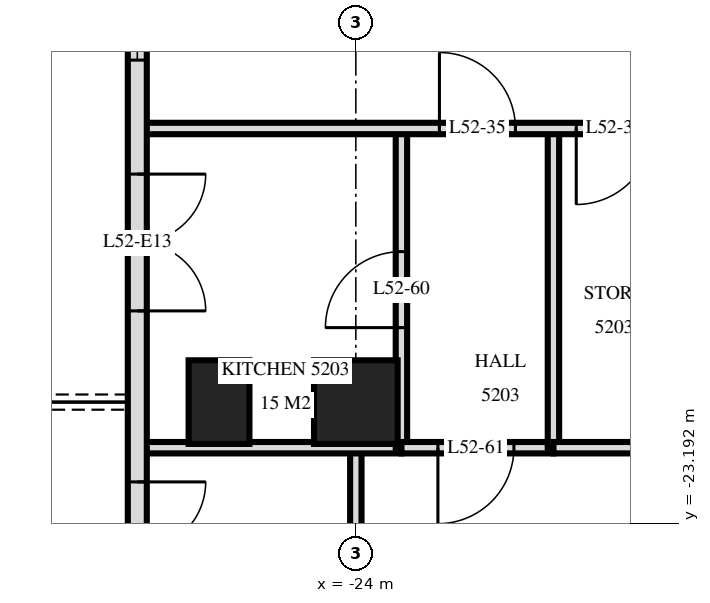
"""IFC4 building model, lengths in metres.
Left out: names, types, materials, properties, quantities, classifications, styles, units other than length and angle.
Written with IfcOpenShell. Run it as: python <this file> out.ifc"""

import sys

from ifc_helpers import new_model, si_unit, direction, frame, frame_2d, origin, origin_2d, place, context, subcontext, project, spatial, rectangle, extrude, element, fill, save


model = new_model("IFC4")
c1 = context("Model", 3, precision=1e-05, world=origin(), true_north=direction((0.0, 1.0)))
c2 = subcontext(c1, "Body", "Model", "MODEL_VIEW")
j1 = project(units=[si_unit("LENGTHUNIT", "METRE"), si_unit("PLANEANGLEUNIT", "RADIAN")], contexts=[c1])
p1 = place(None, origin())
s1 = spatial("IfcSite", under=j1, at=p1, CompositionType="ELEMENT")
p2 = place(p1, origin())
s2 = spatial("IfcBuilding", under=s1, at=p2, CompositionType="ELEMENT")
p3 = place(p2, frame((0.0, 0.0, 201.1)))
s3 = spatial("IfcBuildingStorey", under=s2, at=p3, CompositionType="ELEMENT", Elevation=201.1)
p4 = place(p3, frame((-25.8, -21.6, 0.0), z_axis=(0.0, 0.0, 1.0), x_axis=(0.0, 1.0, 0.0)))
e1 = element("IfcColumn", 1, at=p4, inside=s3, PredefinedType="COLUMN", context=c2, shape_type="SweptSolid", body=[
    extrude(rectangle(XDim=1.1, YDim=0.8, at=origin_2d()), origin(), (0.0, 0.0, 1.0), 3.5),
])
p5 = place(p3, frame((-24.0, -21.6, 0.0), z_axis=(0.0, 0.0, 1.0), x_axis=(1.0, 0.0, 0.0)))
e2 = element("IfcColumn", 2, at=p5, inside=s3, PredefinedType="COLUMN", context=c2, shape_type="SweptSolid", body=[
    extrude(rectangle(XDim=1.1, YDim=1.1, at=origin_2d()), origin(), (0.0, 0.0, 1.0), 3.5),
])
p6 = place(p3, frame((-26.875, -3.325, 0.0), z_axis=(0.0, 0.0, 1.0), x_axis=(0.0, -1.0, 0.0)))
e3 = element("IfcWall", 3, at=p6, inside=s3, PredefinedType="SOLIDWALL", context=c2, shape_type="SweptSolid", body=[
    extrude(rectangle(XDim=21.551, YDim=0.25, at=frame_2d((10.775, 0.0))), origin(), (0.0, 0.0, 1.0), 3.22),
])
p7 = place(p6, frame((7.775, 0.0, 0.0)))
e4 = element("IfcOpeningElement", 4, at=p7, cuts=e3, PredefinedType="OPENING", context=c2, shape_type="SweptSolid", body=[
    extrude(rectangle(XDim=1.8, YDim=2.4, at=frame_2d((0.9, 1.2))), frame((0.0, 0.135, 0.0), z_axis=(0.0, -1.0, 0.0), x_axis=(1.0, 0.0, 0.0)), (0.0, 0.0, 1.0), 0.27),
])
p8 = place(p6, frame((12.575, 0.0, 0.9)))
e5 = element("IfcOpeningElement", 5, at=p8, cuts=e3, PredefinedType="OPENING", context=c2, shape_type="SweptSolid", body=[
    extrude(rectangle(XDim=1.2, YDim=1.5, at=frame_2d((0.6, 0.75))), frame((0.0, 0.135, 0.0), z_axis=(0.0, -1.0, 0.0), x_axis=(1.0, 0.0, 0.0)), (0.0, 0.0, 1.0), 0.27),
])
p9 = place(p6, frame((15.275, 0.0, 0.0)))
e6 = element("IfcOpeningElement", 6, at=p9, cuts=e3, PredefinedType="OPENING", context=c2, shape_type="SweptSolid", body=[
    extrude(rectangle(XDim=1.8, YDim=2.4, at=frame_2d((0.9, 1.2))), frame((0.0, 0.135, 0.0), z_axis=(0.0, -1.0, 0.0), x_axis=(1.0, 0.0, 0.0)), (0.0, 0.0, 1.0), 0.27),
])
p10 = place(p6, frame((19.325, 0.0, 0.0)))
e7 = element("IfcOpeningElement", 7, at=p10, cuts=e3, PredefinedType="OPENING", context=c2, shape_type="SweptSolid", body=[
    extrude(rectangle(XDim=1.8, YDim=2.4, at=frame_2d((0.9, 1.2))), frame((0.0, 0.135, 0.0), z_axis=(0.0, -1.0, 0.0), x_axis=(1.0, 0.0, 0.0)), (0.0, 0.0, 1.0), 0.27),
])
p11 = place(p3, frame((-21.4, -22.2, 0.0), z_axis=(0.0, 0.0, 1.0), x_axis=(0.0, 1.0, 0.0)))
e8 = element("IfcWall", 8, at=p11, inside=s3, PredefinedType="PARTITIONING", context=c2, shape_type="SweptSolid", body=[
    extrude(rectangle(XDim=4.2, YDim=0.15, at=frame_2d((2.1, 0.0))), origin(), (0.0, 0.0, 1.0), 3.22),
])
p12 = place(p3, frame((-23.4, -22.2, 0.0), z_axis=(0.0, 0.0, 1.0), x_axis=(0.0, 1.0, 0.0)))
e9 = element("IfcWall", 9, at=p12, inside=s3, PredefinedType="PARTITIONING", context=c2, shape_type="SweptSolid", body=[
    extrude(rectangle(XDim=4.2, YDim=0.15, at=frame_2d((2.1, 0.0))), origin(), (0.0, 0.0, 1.0), 3.22),
])
p13 = place(p12, frame((1.58, 0.0, 0.0)))
e10 = element("IfcOpeningElement", 10, at=p13, cuts=e9, PredefinedType="OPENING", context=c2, shape_type="SweptSolid", body=[
    extrude(rectangle(XDim=1.0, YDim=2.1, at=frame_2d((0.5, 1.05))), frame((0.0, 0.085, 0.0), z_axis=(0.0, -1.0, 0.0), x_axis=(1.0, 0.0, 0.0)), (0.0, 0.0, 1.0), 0.17),
])
p14 = place(p3, frame((-24.0, -28.918, 0.0), z_axis=(0.0, 0.0, 1.0), x_axis=(0.0, 1.0, 0.0)))
e11 = element("IfcWall", 11, at=p14, inside=s3, PredefinedType="PARTITIONING", context=c2, shape_type="SweptSolid", body=[
    extrude(rectangle(XDim=6.718, YDim=0.15, at=frame_2d((3.359, 0.0))), origin(), (0.0, 0.0, 1.0), 3.22),
])
p15 = place(p14, frame((2.936, 0.0, 0.0)))
e12 = element("IfcOpeningElement", 12, at=p15, cuts=e11, PredefinedType="OPENING", context=c2, shape_type="SweptSolid", body=[
    extrude(rectangle(XDim=0.9, YDim=2.1, at=frame_2d((0.45, 1.05))), frame((0.0, 0.085, 0.0), z_axis=(0.0, -1.0, 0.0), x_axis=(1.0, 0.0, 0.0)), (0.0, 0.0, 1.0), 0.17),
])
p16 = place(p3, frame((-23.4, -22.2, 0.0), z_axis=(0.0, 0.0, 1.0), x_axis=(1.0, 0.0, 0.0)))
e13 = element("IfcWall", 13, at=p16, inside=s3, PredefinedType="PARTITIONING", context=c2, shape_type="SweptSolid", body=[
    extrude(rectangle(XDim=2.0, YDim=0.15, at=frame_2d((1.0, 0.0))), origin(), (0.0, 0.0, 1.0), 3.22),
])
p17 = place(p16, frame((0.48, 0.0, 0.0)))
e14 = element("IfcOpeningElement", 14, at=p17, cuts=e13, PredefinedType="OPENING", context=c2, shape_type="SweptSolid", body=[
    extrude(rectangle(XDim=1.0, YDim=2.1, at=frame_2d((0.5, 1.05))), frame((0.0, 0.085, 0.0), z_axis=(0.0, -1.0, 0.0), x_axis=(1.0, 0.0, 0.0)), (0.0, 0.0, 1.0), 0.17),
])
p18 = place(p3, frame((-26.82, -22.2, 0.0), z_axis=(0.0, 0.0, 1.0), x_axis=(1.0, 0.0, 0.0)))
e15 = element("IfcWall", 15, at=p18, inside=s3, PredefinedType="PARTITIONING", context=c2, shape_type="SweptSolid", body=[
    extrude(rectangle(XDim=3.42, YDim=0.15, at=frame_2d((1.71, 0.0))), origin(), (0.0, 0.0, 1.0), 3.22),
])
p19 = place(p3, frame((-21.4, -22.2, 0.0), z_axis=(0.0, 0.0, 1.0), x_axis=(1.0, 0.0, 0.0)))
e16 = element("IfcWall", 16, at=p19, inside=s3, PredefinedType="PARTITIONING", context=c2, shape_type="SweptSolid", body=[
    extrude(rectangle(XDim=6.4, YDim=0.15, at=frame_2d((3.2, 0.0))), origin(), (0.0, 0.0, 1.0), 3.22),
])
p20 = place(p19, frame((4.78, 0.0, 0.0)))
e17 = element("IfcOpeningElement", 17, at=p20, cuts=e16, PredefinedType="OPENING", context=c2, shape_type="SweptSolid", body=[
    extrude(rectangle(XDim=0.8, YDim=2.1, at=frame_2d((0.4, 1.05))), frame((0.0, 0.085, 0.0), z_axis=(0.0, -1.0, 0.0), x_axis=(1.0, 0.0, 0.0)), (0.0, 0.0, 1.0), 0.17),
])
p21 = place(p19, frame((1.95, 0.0, 0.0)))
e18 = element("IfcOpeningElement", 18, at=p21, cuts=e16, PredefinedType="OPENING", context=c2, shape_type="SweptSolid", body=[
    extrude(rectangle(XDim=0.8, YDim=2.1, at=frame_2d((0.4, 1.05))), frame((0.0, 0.085, 0.0), z_axis=(0.0, -1.0, 0.0), x_axis=(1.0, 0.0, 0.0)), (0.0, 0.0, 1.0), 0.17),
])
p22 = place(p3, frame((-26.82, -18.0, 0.0), z_axis=(0.0, 0.0, 1.0), x_axis=(1.0, 0.0, 0.0)))
e19 = element("IfcWall", 19, at=p22, inside=s3, PredefinedType="PARTITIONING", context=c2, shape_type="SweptSolid", body=[
    extrude(rectangle(XDim=53.64, YDim=0.15, at=frame_2d((26.82, 0.0))), origin(), (0.0, 0.0, 1.0), 3.22),
])
p23 = place(p22, frame((11.97, 0.0, 0.0)))
e20 = element("IfcOpeningElement", 20, at=p23, cuts=e19, PredefinedType="OPENING", context=c2, shape_type="SweptSolid", body=[
    extrude(rectangle(XDim=1.0, YDim=2.1, at=frame_2d((0.5, 1.05))), frame((0.0, 0.085, 0.0), z_axis=(0.0, -1.0, 0.0), x_axis=(1.0, 0.0, 0.0)), (0.0, 0.0, 1.0), 0.17),
])
p24 = place(p22, frame((3.92, 0.0, 0.0)))
e21 = element("IfcOpeningElement", 21, at=p24, cuts=e19, PredefinedType="OPENING", context=c2, shape_type="SweptSolid", body=[
    extrude(rectangle(XDim=1.0, YDim=2.1, at=frame_2d((0.5, 1.05))), frame((0.0, 0.085, 0.0), z_axis=(0.0, -1.0, 0.0), x_axis=(1.0, 0.0, 0.0)), (0.0, 0.0, 1.0), 0.17),
])
p25 = place(p22, frame((5.72, 0.0, 0.0)))
e22 = element("IfcOpeningElement", 22, at=p25, cuts=e19, PredefinedType="OPENING", context=c2, shape_type="SweptSolid", body=[
    extrude(rectangle(XDim=1.0, YDim=2.1, at=frame_2d((0.5, 1.05))), frame((0.0, 0.085, 0.0), z_axis=(0.0, -1.0, 0.0), x_axis=(1.0, 0.0, 0.0)), (0.0, 0.0, 1.0), 0.17),
])
p26 = place(p22, frame((40.67, 0.0, 0.0)))
e23 = element("IfcOpeningElement", 23, at=p26, cuts=e19, PredefinedType="OPENING", context=c2, shape_type="SweptSolid", body=[
    extrude(rectangle(XDim=1.0, YDim=2.1, at=frame_2d((0.5, 1.05))), frame((0.0, 0.085, 0.0), z_axis=(0.0, -1.0, 0.0), x_axis=(1.0, 0.0, 0.0)), (0.0, 0.0, 1.0), 0.17),
])
p27 = place(p22, frame((48.72, 0.0, 0.0)))
e24 = element("IfcOpeningElement", 24, at=p27, cuts=e19, PredefinedType="OPENING", context=c2, shape_type="SweptSolid", body=[
    extrude(rectangle(XDim=1.0, YDim=2.1, at=frame_2d((0.5, 1.05))), frame((0.0, 0.085, 0.0), z_axis=(0.0, -1.0, 0.0), x_axis=(1.0, 0.0, 0.0)), (0.0, 0.0, 1.0), 0.17),
])
p28 = place(p22, frame((46.92, 0.0, 0.0)))
e25 = element("IfcOpeningElement", 25, at=p28, cuts=e19, PredefinedType="OPENING", context=c2, shape_type="SweptSolid", body=[
    extrude(rectangle(XDim=1.0, YDim=2.1, at=frame_2d((0.5, 1.05))), frame((0.0, 0.085, 0.0), z_axis=(0.0, -1.0, 0.0), x_axis=(1.0, 0.0, 0.0)), (0.0, 0.0, 1.0), 0.17),
])
p29 = place(p22, frame((17.32, 0.0, 0.0)))
e26 = element("IfcOpeningElement", 26, at=p29, cuts=e19, PredefinedType="OPENING", context=c2, shape_type="SweptSolid", body=[
    extrude(rectangle(XDim=1.0, YDim=2.1, at=frame_2d((0.5, 1.05))), frame((0.0, 0.085, 0.0), z_axis=(0.0, -1.0, 0.0), x_axis=(1.0, 0.0, 0.0)), (0.0, 0.0, 1.0), 0.17),
])
p30 = place(p22, frame((23.32, 0.0, 0.0)))
e27 = element("IfcOpeningElement", 27, at=p30, cuts=e19, PredefinedType="OPENING", context=c2, shape_type="SweptSolid", body=[
    extrude(rectangle(XDim=1.0, YDim=2.1, at=frame_2d((0.5, 1.05))), frame((0.0, 0.085, 0.0), z_axis=(0.0, -1.0, 0.0), x_axis=(1.0, 0.0, 0.0)), (0.0, 0.0, 1.0), 0.17),
])
p31 = place(p22, frame((29.32, 0.0, 0.0)))
e28 = element("IfcOpeningElement", 28, at=p31, cuts=e19, PredefinedType="OPENING", context=c2, shape_type="SweptSolid", body=[
    extrude(rectangle(XDim=1.0, YDim=2.1, at=frame_2d((0.5, 1.05))), frame((0.0, 0.085, 0.0), z_axis=(0.0, -1.0, 0.0), x_axis=(1.0, 0.0, 0.0)), (0.0, 0.0, 1.0), 0.17),
])
p32 = place(p22, frame((35.32, 0.0, 0.0)))
e29 = element("IfcOpeningElement", 29, at=p32, cuts=e19, PredefinedType="OPENING", context=c2, shape_type="SweptSolid", body=[
    extrude(rectangle(XDim=1.0, YDim=2.1, at=frame_2d((0.5, 1.05))), frame((0.0, 0.085, 0.0), z_axis=(0.0, -1.0, 0.0), x_axis=(1.0, 0.0, 0.0)), (0.0, 0.0, 1.0), 0.17),
])
p33 = place(p8, origin())
e30 = element("IfcWindow", 30, at=p33, inside=s3, PartitioningType="SINGLE_PANEL", PredefinedType="WINDOW", context=c2, shape_type="SweptSolid", body=[
    extrude(rectangle(XDim=1.2, YDim=1.5, at=frame_2d((0.6, 0.75))), frame((0.0, 0.03, 0.0), z_axis=(0.0, -1.0, 0.0), x_axis=(1.0, 0.0, 0.0)), (0.0, 0.0, 1.0), 0.06),
])
fill(e5, e30)
p34 = place(p9, origin())
e31 = element("IfcDoor", 31, at=p34, inside=s3, OperationType="DOUBLE_DOOR_SINGLE_SWING", PredefinedType="DOOR", context=c2, shape_type="SweptSolid", body=[
    extrude(rectangle(XDim=1.8, YDim=2.4, at=frame_2d((0.9, 1.2))), frame((0.0, 0.025, 0.0), z_axis=(0.0, -1.0, 0.0), x_axis=(1.0, 0.0, 0.0)), (0.0, 0.0, 1.0), 0.05),
])
fill(e6, e31)
p35 = place(p10, origin())
e32 = element("IfcDoor", 32, at=p35, inside=s3, OperationType="DOUBLE_DOOR_SINGLE_SWING", PredefinedType="DOOR", context=c2, shape_type="SweptSolid", body=[
    extrude(rectangle(XDim=1.8, YDim=2.4, at=frame_2d((0.9, 1.2))), frame((0.0, 0.025, 0.0), z_axis=(0.0, -1.0, 0.0), x_axis=(1.0, 0.0, 0.0)), (0.0, 0.0, 1.0), 0.05),
])
fill(e7, e32)
p36 = place(p24, origin())
e33 = element("IfcDoor", 33, at=p36, inside=s3, OperationType="SINGLE_SWING_RIGHT", PredefinedType="DOOR", context=c2, shape_type="SweptSolid", body=[
    extrude(rectangle(XDim=1.0, YDim=2.1, at=frame_2d((0.5, 1.05))), frame((0.0, 0.025, 0.0), z_axis=(0.0, -1.0, 0.0), x_axis=(1.0, 0.0, 0.0)), (0.0, 0.0, 1.0), 0.05),
])
fill(e21, e33)
p37 = place(p25, frame((0.5, 0.0, 0.0), z_axis=(0.0, 0.0, 1.0), x_axis=(-1.0, 0.0, 0.0)))
e34 = element("IfcDoor", 34, at=p37, inside=s3, OperationType="SINGLE_SWING_LEFT", PredefinedType="DOOR", context=c2, shape_type="SweptSolid", body=[
    extrude(rectangle(XDim=1.0, YDim=2.1, at=frame_2d((0.0, 1.05))), frame((0.0, -0.025, 0.0), z_axis=(0.0, 1.0, 0.0), x_axis=(-1.0, 0.0, 0.0)), (0.0, 0.0, 1.0), 0.05),
])
fill(e22, e34)
p38 = place(p13, origin())
e35 = element("IfcDoor", 35, at=p38, inside=s3, OperationType="SINGLE_SWING_RIGHT", PredefinedType="DOOR", context=c2, shape_type="SweptSolid", body=[
    extrude(rectangle(XDim=1.0, YDim=2.1, at=frame_2d((0.5, 1.05))), frame((0.0, 0.025, 0.0), z_axis=(0.0, -1.0, 0.0), x_axis=(1.0, 0.0, 0.0)), (0.0, 0.0, 1.0), 0.05),
])
fill(e10, e35)
p39 = place(p17, frame((0.5, 0.0, 0.0), z_axis=(0.0, 0.0, 1.0), x_axis=(-1.0, 0.0, 0.0)))
e36 = element("IfcDoor", 36, at=p39, inside=s3, OperationType="SINGLE_SWING_LEFT", PredefinedType="DOOR", context=c2, shape_type="SweptSolid", body=[
    extrude(rectangle(XDim=1.0, YDim=2.1, at=frame_2d((0.0, 1.05))), frame((0.0, -0.025, 0.0), z_axis=(0.0, 1.0, 0.0), x_axis=(-1.0, 0.0, 0.0)), (0.0, 0.0, 1.0), 0.05),
])
fill(e14, e36)
save(model, sys.argv[1])
